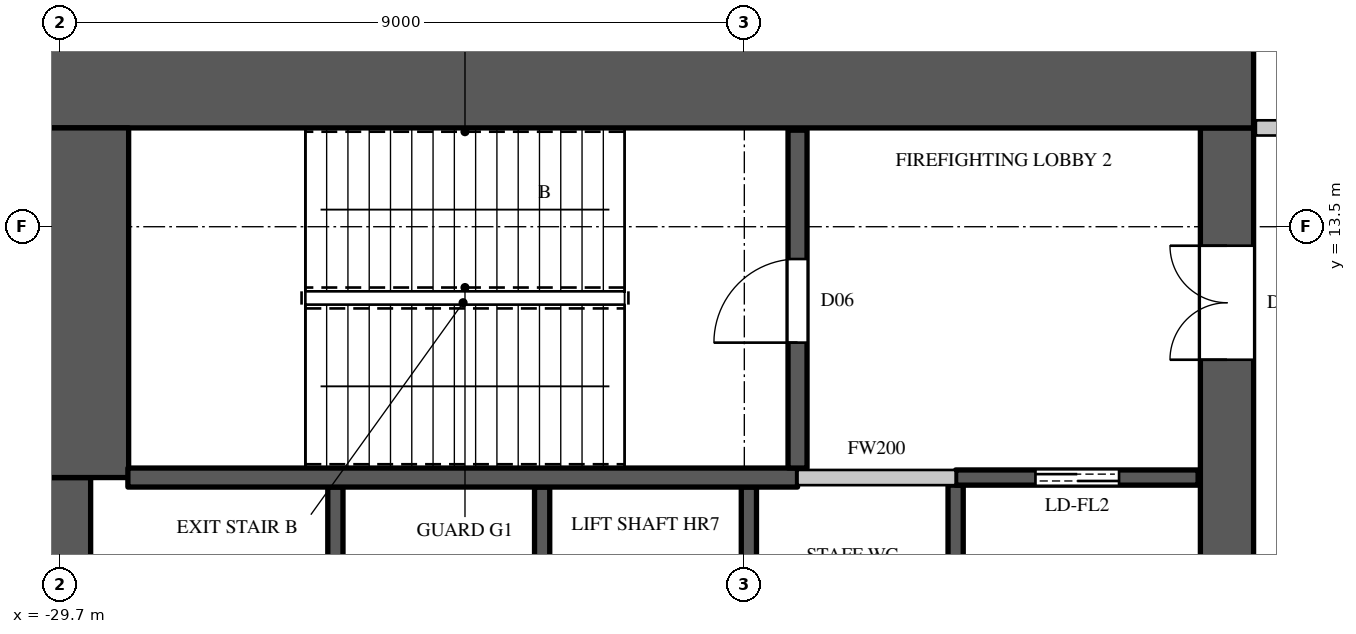
"""IFC4 building model, lengths in metres.
Left out: names, types, materials, properties, quantities, classifications, styles, units other than length and angle.
Written with IfcOpenShell. Run it as: python <this file> out.ifc"""

import sys

from ifc_helpers import new_model, si_unit, direction, frame, frame_2d, origin, place, context, subcontext, project, spatial, rectangle, extrude, element, fill, save


model = new_model("IFC4")
c1 = context("Model", 3, precision=1e-05, world=origin(), true_north=direction((0.0, 1.0)))
c2 = subcontext(c1, "Body", "Model", "MODEL_VIEW")
j1 = project(units=[si_unit("LENGTHUNIT", "METRE"), si_unit("PLANEANGLEUNIT", "RADIAN")], contexts=[c1])
p1 = place(None, origin())
s1 = spatial("IfcSite", under=j1, at=p1, CompositionType="ELEMENT")
p2 = place(p1, origin())
s2 = spatial("IfcBuilding", under=s1, at=p2, CompositionType="ELEMENT")
p3 = place(p2, frame((0.0, 0.0, 329.5)))
s3 = spatial("IfcBuildingStorey", under=s2, at=p3, CompositionType="ELEMENT", Elevation=329.5)
p4 = place(p3, frame((-30.0, 15.4, 0.0), z_axis=(0.0, 0.0, 1.0), x_axis=(1.0, 0.0, 0.0)))
e1 = element("IfcWall", 1, at=p4, inside=s3, PredefinedType="SHEAR", context=c2, shape_type="SweptSolid", body=[
    extrude(rectangle(XDim=16.0, YDim=1.2, at=frame_2d((8.0, 0.0))), origin(), (0.0, 0.0, 1.0), 5.5),
])
p5 = place(p3, frame((-14.35, -14.8, 0.0), z_axis=(0.0, 0.0, 1.0), x_axis=(0.0, 1.0, 0.0)))
e2 = element("IfcWall", 2, at=p5, inside=s3, PredefinedType="SHEAR", context=c2, shape_type="SweptSolid", body=[
    extrude(rectangle(XDim=29.6, YDim=0.7, at=frame_2d((14.8, 0.0))), origin(), (0.0, 0.0, 1.0), 5.5),
])
p6 = place(p5, frame((1.55, 0.0, 0.0)))
e3 = element("IfcOpeningElement", 3, at=p6, cuts=e2, PredefinedType="OPENING", context=c2, shape_type="SweptSolid", body=[
    extrude(rectangle(XDim=1.5, YDim=2.4, at=frame_2d((0.75, 1.2))), frame((0.0, 0.36, 0.0), z_axis=(0.0, -1.0, 0.0), x_axis=(1.0, 0.0, 0.0)), (0.0, 0.0, 1.0), 0.72),
])
p7 = place(p5, frame((26.55, 0.0, 0.0)))
e4 = element("IfcOpeningElement", 4, at=p7, cuts=e2, PredefinedType="OPENING", context=c2, shape_type="SweptSolid", body=[
    extrude(rectangle(XDim=1.5, YDim=2.4, at=frame_2d((0.75, 1.2))), frame((0.0, 0.36, 0.0), z_axis=(0.0, -1.0, 0.0), x_axis=(1.0, 0.0, 0.0)), (0.0, 0.0, 1.0), 0.72),
])
p8 = place(p5, frame((8.45, 0.0, 0.0)))
e5 = element("IfcOpeningElement", 5, at=p8, cuts=e2, PredefinedType="OPENING", context=c2, shape_type="SweptSolid", body=[
    extrude(rectangle(XDim=1.5, YDim=2.4, at=frame_2d((0.75, 1.2))), frame((0.0, 0.36, 0.0), z_axis=(0.0, -1.0, 0.0), x_axis=(1.0, 0.0, 0.0)), (0.0, 0.0, 1.0), 0.72),
])
p9 = place(p5, frame((19.65, 0.0, 0.0)))
e6 = element("IfcOpeningElement", 6, at=p9, cuts=e2, PredefinedType="OPENING", context=c2, shape_type="SweptSolid", body=[
    extrude(rectangle(XDim=1.5, YDim=2.4, at=frame_2d((0.75, 1.2))), frame((0.0, 0.36, 0.0), z_axis=(0.0, -1.0, 0.0), x_axis=(1.0, 0.0, 0.0)), (0.0, 0.0, 1.0), 0.72),
])
p10 = place(p5, frame((14.5, 0.0, 0.0)))
e7 = element("IfcOpeningElement", 7, at=p10, cuts=e2, PredefinedType="OPENING", context=c2, shape_type="SweptSolid", body=[
    extrude(rectangle(XDim=0.6, YDim=2.0, at=frame_2d((0.3, 1.0))), frame((0.0, 0.36, 0.0), z_axis=(0.0, -1.0, 0.0), x_axis=(1.0, 0.0, 0.0)), (0.0, 0.0, 1.0), 0.72),
])
p11 = place(p3, frame((-29.65, -10.2, 0.0), z_axis=(0.0, 0.0, 1.0), x_axis=(0.0, 1.0, 0.0)))
e8 = element("IfcWall", 8, at=p11, inside=s3, PredefinedType="SHEAR", context=c2, shape_type="SweptSolid", body=[
    extrude(rectangle(XDim=20.4, YDim=0.7, at=frame_2d((10.2, 0.0))), origin(), (0.0, 0.0, 1.0), 5.5),
])
p12 = place(p3, frame((-29.4, 10.2, 0.0), z_axis=(0.0, 0.0, 1.0), x_axis=(0.0, 1.0, 0.0)))
e9 = element("IfcWall", 9, at=p12, inside=s3, PredefinedType="SHEAR", context=c2, shape_type="SweptSolid", body=[
    extrude(rectangle(XDim=4.6, YDim=1.2, at=frame_2d((2.3, 0.0))), origin(), (0.0, 0.0, 1.0), 5.5),
])
p13 = place(p3, frame((-20.0, 10.2, 0.0), z_axis=(0.0, 0.0, 1.0), x_axis=(1.0, 0.0, 0.0)))
e10 = element("IfcWall", 10, at=p13, inside=s3, PredefinedType="PARTITIONING", context=c2, shape_type="SweptSolid", body=[
    extrude(rectangle(XDim=2.08, YDim=0.2, at=frame_2d((1.04, 0.0))), origin(), (0.0, 0.0, 1.0), 5.098),
])
p14 = place(p3, frame((-13.97, 14.8, 0.0), z_axis=(0.0, 0.0, 1.0), x_axis=(1.0, 0.0, 0.0)))
e11 = element("IfcWall", 11, at=p14, inside=s3, PredefinedType="PARTITIONING", context=c2, shape_type="SweptSolid", body=[
    extrude(rectangle(XDim=2.27, YDim=0.2, at=frame_2d((1.135, 0.0))), origin(), (0.0, 0.0, 1.0), 5.098),
])
for number, where, z_axis, x_axis in (
    (12, (-26.08, 7.5, 0.0), (0.0, 0.0, 1.0), (0.0, 1.0, 0.0)),
    (13, (-23.36, 7.5, 0.0), (0.0, 0.0, 1.0), (0.0, 1.0, 0.0)),
    (14, (-20.64, 7.5, 0.0), (0.0, 0.0, 1.0), (0.0, 1.0, 0.0)),
):
    element("IfcWall", number, at=place(p3, frame(where, z_axis=z_axis, x_axis=x_axis)), inside=s3, PredefinedType="SHEAR", context=c2, shape_type="SweptSolid", body=[
        extrude(rectangle(XDim=2.575, YDim=0.2, at=frame_2d((1.288, 0.0))), origin(), (0.0, 0.0, 1.0), 5.098),
    ])
p15 = place(p3, frame((-17.92, 7.5, 0.0), z_axis=(0.0, 0.0, 1.0), x_axis=(0.0, 1.0, 0.0)))
e15 = element("IfcWall", 15, at=p15, inside=s3, PredefinedType="SHEAR", context=c2, shape_type="SweptSolid", body=[
    extrude(rectangle(XDim=2.6, YDim=0.2, at=frame_2d((1.3, 0.0))), origin(), (0.0, 0.0, 1.0), 5.098),
])
p16 = place(p3, frame((-17.92, 10.2, 0.0), z_axis=(0.0, 0.0, 1.0), x_axis=(1.0, 0.0, 0.0)))
e16 = element("IfcWall", 16, at=p16, inside=s3, PredefinedType="SHEAR", context=c2, shape_type="SweptSolid", body=[
    extrude(rectangle(XDim=3.19, YDim=0.2, at=frame_2d((1.595, 0.0))), origin(), (0.0, 0.0, 1.0), 5.098),
])
p17 = place(p16, frame((1.05, 0.0, 0.0)))
e17 = element("IfcOpeningElement", 17, at=p17, cuts=e16, PredefinedType="OPENING", context=c2, shape_type="SweptSolid", body=[
    extrude(rectangle(XDim=1.1, YDim=2.2, at=frame_2d((0.55, 1.1))), frame((0.0, 0.11, 0.0), z_axis=(0.0, -1.0, 0.0), x_axis=(1.0, 0.0, 0.0)), (0.0, 0.0, 1.0), 0.22),
])
p18 = place(p3, frame((-28.81, 10.2, 0.0), z_axis=(0.0, 0.0, 1.0), x_axis=(1.0, 0.0, 0.0)))
e18 = element("IfcWall", 18, at=p18, inside=s3, PredefinedType="SHEAR", context=c2, shape_type="SweptSolid", body=[
    extrude(rectangle(XDim=8.81, YDim=0.25, at=frame_2d((4.405, 0.0))), origin(), (0.0, 0.0, 1.0), 5.098),
])
p19 = place(p3, frame((-20.0, 10.325, 0.0), z_axis=(0.0, 0.0, 1.0), x_axis=(0.0, 1.0, 0.0)))
e19 = element("IfcWall", 19, at=p19, inside=s3, PredefinedType="SHEAR", context=c2, shape_type="SweptSolid", body=[
    extrude(rectangle(XDim=4.445, YDim=0.25, at=frame_2d((2.223, 0.0))), origin(), (0.0, 0.0, 1.0), 5.098),
])
p20 = place(p19, frame((1.65, 0.0, 0.0)))
e20 = element("IfcOpeningElement", 20, at=p20, cuts=e19, PredefinedType="OPENING", context=c2, shape_type="SweptSolid", body=[
    extrude(rectangle(XDim=1.1, YDim=2.2, at=frame_2d((0.55, 1.1))), frame((0.0, 0.135, 0.0), z_axis=(0.0, -1.0, 0.0), x_axis=(1.0, 0.0, 0.0)), (0.0, 0.0, 1.0), 0.27),
])
p21 = place(p20, origin())
e21 = element("IfcDoor", 21, at=p21, inside=s3, OperationType="SINGLE_SWING_LEFT", PredefinedType="DOOR", context=c2, shape_type="SweptSolid", body=[
    extrude(rectangle(XDim=1.1, YDim=2.2, at=frame_2d((0.55, 1.1))), frame((0.0, 0.025, 0.0), z_axis=(0.0, -1.0, 0.0), x_axis=(1.0, 0.0, 0.0)), (0.0, 0.0, 1.0), 0.05),
])
fill(e20, e21)
p22 = place(p17, origin())
e22 = element("IfcDoor", 22, at=p22, inside=s3, OperationType="DOUBLE_DOOR_SLIDING", PredefinedType="DOOR", context=c2, shape_type="SweptSolid", body=[
    extrude(rectangle(XDim=1.1, YDim=2.2, at=frame_2d((0.55, 1.1))), frame((0.0, 0.025, 0.0), z_axis=(0.0, -1.0, 0.0), x_axis=(1.0, 0.0, 0.0)), (0.0, 0.0, 1.0), 0.05),
])
fill(e17, e22)
p23 = place(p7, origin())
e23 = element("IfcDoor", 23, at=p23, inside=s3, OperationType="DOUBLE_DOOR_SINGLE_SWING", PredefinedType="DOOR", context=c2, shape_type="SweptSolid", body=[
    extrude(rectangle(XDim=1.5, YDim=2.4, at=frame_2d((0.75, 1.2))), frame((0.0, 0.345, 0.0), z_axis=(0.0, -1.0, 0.0), x_axis=(1.0, 0.0, 0.0)), (0.0, 0.0, 1.0), 0.05),
])
fill(e4, e23)
save(model, sys.argv[1])
